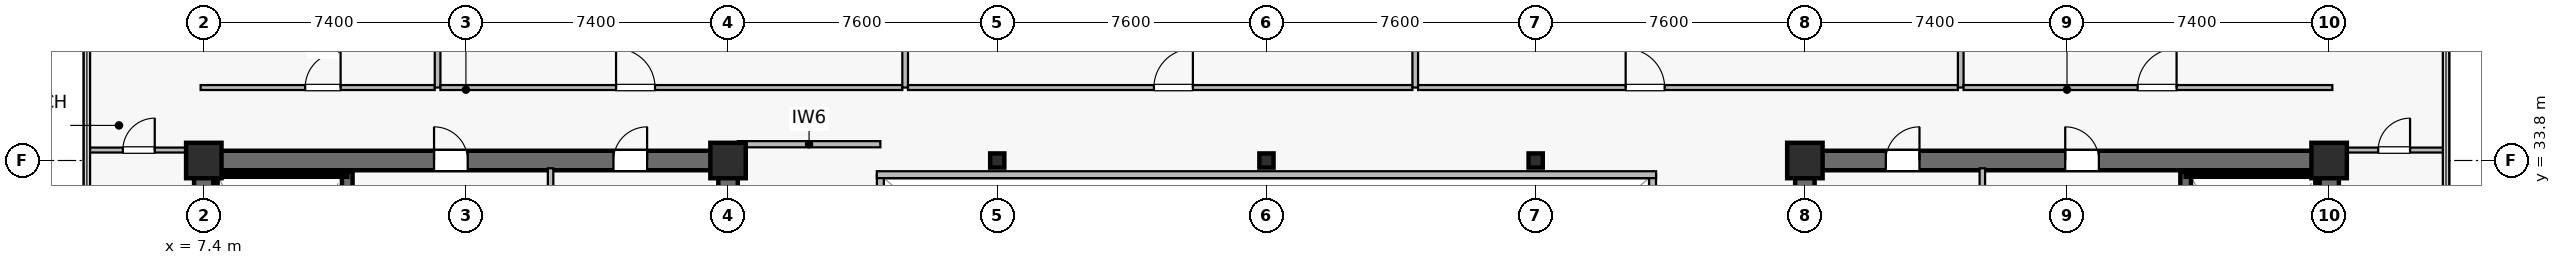
"""IFC4 building model, lengths in metres.
Left out: names, types, materials, properties, quantities, classifications, styles, units other than length and angle.
Written with IfcOpenShell. Run it as: python <this file> out.ifc"""

import sys

from ifc_helpers import new_model, si_unit, direction, frame, frame_2d, origin, origin_2d, place, context, subcontext, project, spatial, rectangle, hollow_rectangle, extrude, source, transform, mapped, element, fill, save


model = new_model("IFC4")
c1 = context("Model", 3, precision=1e-05, world=origin(), true_north=direction((0.0, 1.0)))
c2 = subcontext(c1, "Body", "Model", "MODEL_VIEW")
j1 = project(units=[si_unit("LENGTHUNIT", "METRE"), si_unit("PLANEANGLEUNIT", "RADIAN")], contexts=[c1])
p1 = place(None, origin())
s1 = spatial("IfcSite", under=j1, at=p1, CompositionType="ELEMENT")
p2 = place(p1, origin())
s2 = spatial("IfcBuilding", under=s1, at=p2, CompositionType="ELEMENT")
p3 = place(p2, frame((0.0, 0.0, 217.8)))
s3 = spatial("IfcBuildingStorey", under=s2, at=p3, CompositionType="ELEMENT", Elevation=217.8)
p4 = place(p3, frame((7.125, 33.8, 0.0), z_axis=(0.0, 0.0, 1.0), x_axis=(1.0, 0.0, 0.0)))
e1 = element("IfcWall", 1, at=p4, inside=s3, PredefinedType="SHEAR", context=c2, shape_type="SweptSolid", body=[
    extrude(rectangle(XDim=15.35, YDim=0.55, at=frame_2d((7.675, 0.0))), origin(), (0.0, 0.0, 1.0), 3.8),
])
p5 = place(p4, frame((6.775, 0.0, 0.0)))
e2 = element("IfcOpeningElement", 2, at=p5, cuts=e1, PredefinedType="OPENING", context=c2, shape_type="SweptSolid", body=[
    extrude(rectangle(XDim=0.95, YDim=2.15, at=frame_2d((0.475, 1.075))), frame((0.0, 0.285, 0.0), z_axis=(0.0, -1.0, 0.0), x_axis=(1.0, 0.0, 0.0)), (0.0, 0.0, 1.0), 0.57),
])
p6 = place(p4, frame((11.84, 0.0, 0.0)))
e3 = element("IfcOpeningElement", 3, at=p6, cuts=e1, PredefinedType="OPENING", context=c2, shape_type="SweptSolid", body=[
    extrude(rectangle(XDim=0.95, YDim=2.15, at=frame_2d((0.475, 1.075))), frame((0.0, 0.285, 0.0), z_axis=(0.0, -1.0, 0.0), x_axis=(1.0, 0.0, 0.0)), (0.0, 0.0, 1.0), 0.57),
])
p7 = place(p3, frame((7.4, 15.075, 0.0), z_axis=(0.0, 0.0, 1.0), x_axis=(0.0, 1.0, 0.0)))
e4 = element("IfcWall", 4, at=p7, inside=s3, PredefinedType="SHEAR", context=c2, shape_type="SweptSolid", body=[
    extrude(rectangle(XDim=18.45, YDim=0.55, at=frame_2d((9.225, 0.0))), origin(), (0.0, 0.0, 1.0), 3.8),
])
p8 = place(p3, frame((22.2, 15.075, 0.0), z_axis=(0.0, 0.0, 1.0), x_axis=(0.0, 1.0, 0.0)))
e5 = element("IfcWall", 5, at=p8, inside=s3, PredefinedType="SHEAR", context=c2, shape_type="SweptSolid", body=[
    extrude(rectangle(XDim=18.45, YDim=0.55, at=frame_2d((9.225, 0.0))), origin(), (0.0, 0.0, 1.0), 3.8),
])
p9 = place(p8, frame((3.475, 0.0, 0.0)))
e6 = element("IfcOpeningElement", 6, at=p9, cuts=e5, PredefinedType="OPENING", context=c2, shape_type="SweptSolid", body=[
    extrude(rectangle(XDim=1.42, YDim=2.2, at=frame_2d((0.71, 1.1))), frame((0.0, 0.285, 0.0), z_axis=(0.0, -1.0, 0.0), x_axis=(1.0, 0.0, 0.0)), (0.0, 0.0, 1.0), 0.57),
])
p10 = place(p3, frame((11.45, 24.85, 0.0), z_axis=(0.0, 0.0, 1.0), x_axis=(0.0, 1.0, 0.0)))
e7 = element("IfcWall", 7, at=p10, inside=s3, PredefinedType="SHEAR", context=c2, shape_type="SweptSolid", body=[
    extrude(rectangle(XDim=8.63, YDim=0.3, at=frame_2d((4.315, 0.0))), origin(), (0.0, 0.0, 1.0), 3.8),
])
p11 = place(p10, frame((0.42, 0.0, 0.0)))
e8 = element("IfcOpeningElement", 8, at=p11, cuts=e7, PredefinedType="OPENING", context=c2, shape_type="SweptSolid", body=[
    extrude(rectangle(XDim=1.1, YDim=2.15, at=frame_2d((0.55, 1.075))), frame((0.0, 0.16, 0.0), z_axis=(0.0, -1.0, 0.0), x_axis=(1.0, 0.0, 0.0)), (0.0, 0.0, 1.0), 0.32),
])
p12 = place(p3, frame((7.73, 33.4, 0.0), z_axis=(0.0, 0.0, 1.0), x_axis=(1.0, 0.0, 0.0)))
e9 = element("IfcWall", 9, at=p12, inside=s3, PredefinedType="SOLIDWALL", context=c2, shape_type="SweptSolid", body=[
    extrude(rectangle(XDim=3.72, YDim=0.12, at=frame_2d((1.86, 0.0))), origin(), (0.0, 0.0, 1.0), 3.8),
])
p13 = place(p3, frame((7.73, 25.0, 0.0), z_axis=(0.0, 0.0, 1.0), x_axis=(0.0, 1.0, 0.0)))
e10 = element("IfcWall", 10, at=p13, inside=s3, PredefinedType="SOLIDWALL", context=c2, shape_type="SweptSolid", body=[
    extrude(rectangle(XDim=8.32, YDim=0.12, at=frame_2d((4.16, 0.0))), origin(), (0.0, 0.0, 1.0), 3.8),
])
p14 = place(p3, frame((52.325, 33.8, 0.0), z_axis=(0.0, 0.0, 1.0), x_axis=(1.0, 0.0, 0.0)))
e11 = element("IfcWall", 11, at=p14, inside=s3, PredefinedType="SHEAR", context=c2, shape_type="SweptSolid", body=[
    extrude(rectangle(XDim=15.35, YDim=0.55, at=frame_2d((7.675, 0.0))), origin(), (0.0, 0.0, 1.0), 3.8),
])
p15 = place(p14, frame((7.625, 0.0, 0.0)))
e12 = element("IfcOpeningElement", 12, at=p15, cuts=e11, PredefinedType="OPENING", context=c2, shape_type="SweptSolid", body=[
    extrude(rectangle(XDim=0.95, YDim=2.15, at=frame_2d((0.475, 1.075))), frame((0.0, 0.285, 0.0), z_axis=(0.0, -1.0, 0.0), x_axis=(1.0, 0.0, 0.0)), (0.0, 0.0, 1.0), 0.57),
])
p16 = place(p14, frame((2.56, 0.0, 0.0)))
e13 = element("IfcOpeningElement", 13, at=p16, cuts=e11, PredefinedType="OPENING", context=c2, shape_type="SweptSolid", body=[
    extrude(rectangle(XDim=0.95, YDim=2.15, at=frame_2d((0.475, 1.075))), frame((0.0, 0.285, 0.0), z_axis=(0.0, -1.0, 0.0), x_axis=(1.0, 0.0, 0.0)), (0.0, 0.0, 1.0), 0.57),
])
p17 = place(p3, frame((52.6, 15.075, 0.0), z_axis=(0.0, 0.0, 1.0), x_axis=(0.0, 1.0, 0.0)))
e14 = element("IfcWall", 14, at=p17, inside=s3, PredefinedType="SHEAR", context=c2, shape_type="SweptSolid", body=[
    extrude(rectangle(XDim=18.45, YDim=0.55, at=frame_2d((9.225, 0.0))), origin(), (0.0, 0.0, 1.0), 3.8),
])
p18 = place(p17, frame((3.475, 0.0, 0.0)))
e15 = element("IfcOpeningElement", 15, at=p18, cuts=e14, PredefinedType="OPENING", context=c2, shape_type="SweptSolid", body=[
    extrude(rectangle(XDim=1.42, YDim=2.2, at=frame_2d((0.71, 1.1))), frame((0.0, 0.285, 0.0), z_axis=(0.0, -1.0, 0.0), x_axis=(1.0, 0.0, 0.0)), (0.0, 0.0, 1.0), 0.57),
])
p19 = place(p3, frame((67.4, 15.075, 0.0), z_axis=(0.0, 0.0, 1.0), x_axis=(0.0, 1.0, 0.0)))
e16 = element("IfcWall", 16, at=p19, inside=s3, PredefinedType="SHEAR", context=c2, shape_type="SweptSolid", body=[
    extrude(rectangle(XDim=18.45, YDim=0.55, at=frame_2d((9.225, 0.0))), origin(), (0.0, 0.0, 1.0), 3.8),
])
p20 = place(p3, frame((63.35, 24.85, 0.0), z_axis=(0.0, 0.0, 1.0), x_axis=(0.0, 1.0, 0.0)))
e17 = element("IfcWall", 17, at=p20, inside=s3, PredefinedType="SHEAR", context=c2, shape_type="SweptSolid", body=[
    extrude(rectangle(XDim=8.63, YDim=0.3, at=frame_2d((4.315, 0.0))), origin(), (0.0, 0.0, 1.0), 3.8),
])
p21 = place(p20, frame((0.42, 0.0, 0.0)))
e18 = element("IfcOpeningElement", 18, at=p21, cuts=e17, PredefinedType="OPENING", context=c2, shape_type="SweptSolid", body=[
    extrude(rectangle(XDim=1.1, YDim=2.15, at=frame_2d((0.55, 1.075))), frame((0.0, 0.16, 0.0), z_axis=(0.0, -1.0, 0.0), x_axis=(1.0, 0.0, 0.0)), (0.0, 0.0, 1.0), 0.32),
])
p22 = place(p3, frame((63.35, 33.4, 0.0), z_axis=(0.0, 0.0, 1.0), x_axis=(1.0, 0.0, 0.0)))
e19 = element("IfcWall", 19, at=p22, inside=s3, PredefinedType="SOLIDWALL", context=c2, shape_type="SweptSolid", body=[
    extrude(rectangle(XDim=3.72, YDim=0.12, at=frame_2d((1.86, 0.0))), origin(), (0.0, 0.0, 1.0), 3.8),
])
p23 = place(p3, frame((67.07, 25.0, 0.0), z_axis=(0.0, 0.0, 1.0), x_axis=(0.0, 1.0, 0.0)))
e20 = element("IfcWall", 20, at=p23, inside=s3, PredefinedType="SOLIDWALL", context=c2, shape_type="SweptSolid", body=[
    extrude(rectangle(XDim=8.32, YDim=0.12, at=frame_2d((4.16, 0.0))), origin(), (0.0, 0.0, 1.0), 3.8),
])
m1 = source(origin(), c2, "Body", "SweptSolid", [
    extrude(rectangle(XDim=1.0, YDim=1.0, at=origin_2d()), origin(), (0.0, 0.0, 1.0), 4.1),
])
for number, where, z_axis, x_axis in (
    (21, (7.4, 33.8, 0.0), (0.0, 0.0, 1.0), (1.0, 0.0, 0.0)),
    (22, (22.2, 33.8, 0.0), (0.0, 0.0, 1.0), (1.0, 0.0, 0.0)),
    (23, (52.6, 33.8, 0.0), (0.0, 0.0, 1.0), (1.0, 0.0, 0.0)),
    (24, (67.4, 33.8, 0.0), (0.0, 0.0, 1.0), (1.0, 0.0, 0.0)),
):
    element("IfcColumn", number, at=place(p3, frame(where, z_axis=z_axis, x_axis=x_axis)), inside=s3, PredefinedType="COLUMN", context=c2, shape_type="MappedRepresentation", body=[
        mapped(m1, transform((0.0, 0.0, 0.0), scale=1.0)),
    ])
m2 = source(origin(), c2, "Body", "SweptSolid", [
    extrude(hollow_rectangle(XDim=0.4, YDim=0.4, WallThickness=0.019, at=origin_2d()), origin(), (0.0, 0.0, 1.0), 4.1),
])
for number, where, z_axis, x_axis in (
    (25, (29.8, 33.8, 0.0), (0.0, 0.0, 1.0), (1.0, 0.0, 0.0)),
    (26, (37.4, 33.8, 0.0), (0.0, 0.0, 1.0), (1.0, 0.0, 0.0)),
    (27, (45.0, 33.8, 0.0), (0.0, 0.0, 1.0), (1.0, 0.0, 0.0)),
):
    element("IfcColumn", number, at=place(p3, frame(where, z_axis=z_axis, x_axis=x_axis)), inside=s3, PredefinedType="COLUMN", context=c2, shape_type="MappedRepresentation", body=[
        mapped(m2, transform((0.0, 0.0, 0.0), scale=1.0)),
    ])
for number, where, z_axis, x_axis in (
    (28, (17.19, 29.65, 0.0), (0.0, 0.0, 1.0), (0.0, 1.0, 0.0)),
    (29, (57.61, 29.65, 0.0), (0.0, 0.0, 1.0), (0.0, 1.0, 0.0)),
):
    element("IfcWall", number, at=place(p3, frame(where, z_axis=z_axis, x_axis=x_axis)), inside=s3, PredefinedType="PLUMBINGWALL", context=c2, shape_type="SweptSolid", body=[
        extrude(rectangle(XDim=3.93, YDim=0.155, at=frame_2d((1.965, 0.0))), origin(), (0.0, 0.0, 1.0), 3.8),
    ])
p24 = place(p3, frame((22.475, 34.26, 0.0), z_axis=(0.0, 0.0, 1.0), x_axis=(1.0, 0.0, 0.0)))
e30 = element("IfcWall", 30, at=p24, inside=s3, PredefinedType="PARTITIONING", context=c2, shape_type="SweptSolid", body=[
    extrude(rectangle(XDim=4.025, YDim=0.175, at=frame_2d((2.012, 0.0))), origin(), (0.0, 0.0, 1.0), 3.485),
])
p25 = place(p3, frame((26.5, 15.2, 0.0), z_axis=(0.0, 0.0, 1.0), x_axis=(0.0, 1.0, 0.0)))
e31 = element("IfcWall", 31, at=p25, inside=s3, PredefinedType="SOLIDWALL", context=c2, shape_type="SweptSolid", body=[
    extrude(rectangle(XDim=18.2, YDim=0.195, at=frame_2d((9.1, 0.0))), origin(), (0.0, 0.0, 1.0), 3.8),
])
p26 = place(p25, frame((1.8, 0.0, 0.9)))
e32 = element("IfcOpeningElement", 32, at=p26, cuts=e31, PredefinedType="OPENING", context=c2, shape_type="SweptSolid", body=[
    extrude(rectangle(XDim=1.5, YDim=1.4, at=frame_2d((0.75, 0.7))), frame((0.0, 0.107, 0.0), z_axis=(0.0, -1.0, 0.0), x_axis=(1.0, 0.0, 0.0)), (0.0, 0.0, 1.0), 0.215),
])
p27 = place(p25, frame((13.2, 0.0, 0.9)))
e33 = element("IfcOpeningElement", 33, at=p27, cuts=e31, PredefinedType="OPENING", context=c2, shape_type="SweptSolid", body=[
    extrude(rectangle(XDim=1.5, YDim=1.4, at=frame_2d((0.75, 0.7))), frame((0.0, 0.107, 0.0), z_axis=(0.0, -1.0, 0.0), x_axis=(1.0, 0.0, 0.0)), (0.0, 0.0, 1.0), 0.215),
])
p28 = place(p3, frame((48.3, 15.2, 0.0), z_axis=(0.0, 0.0, 1.0), x_axis=(0.0, 1.0, 0.0)))
e34 = element("IfcWall", 34, at=p28, inside=s3, PredefinedType="SOLIDWALL", context=c2, shape_type="SweptSolid", body=[
    extrude(rectangle(XDim=18.2, YDim=0.195, at=frame_2d((9.1, 0.0))), origin(), (0.0, 0.0, 1.0), 3.8),
])
p29 = place(p28, frame((1.8, 0.0, 0.9)))
e35 = element("IfcOpeningElement", 35, at=p29, cuts=e34, PredefinedType="OPENING", context=c2, shape_type="SweptSolid", body=[
    extrude(rectangle(XDim=1.5, YDim=1.4, at=frame_2d((0.75, 0.7))), frame((0.0, 0.107, 0.0), z_axis=(0.0, -1.0, 0.0), x_axis=(1.0, 0.0, 0.0)), (0.0, 0.0, 1.0), 0.215),
])
p30 = place(p28, frame((13.2, 0.0, 0.9)))
e36 = element("IfcOpeningElement", 36, at=p30, cuts=e34, PredefinedType="OPENING", context=c2, shape_type="SweptSolid", body=[
    extrude(rectangle(XDim=1.5, YDim=1.4, at=frame_2d((0.75, 0.7))), frame((0.0, 0.107, 0.0), z_axis=(0.0, -1.0, 0.0), x_axis=(1.0, 0.0, 0.0)), (0.0, 0.0, 1.0), 0.215),
])
p31 = place(p3, frame((26.4, 33.4, 0.0), z_axis=(0.0, 0.0, 1.0), x_axis=(1.0, 0.0, 0.0)))
e37 = element("IfcWall", 37, at=p31, inside=s3, PredefinedType="SOLIDWALL", context=c2, shape_type="SweptSolid", body=[
    extrude(rectangle(XDim=22.0, YDim=0.195, at=frame_2d((11.0, 0.0))), origin(), (0.0, 0.0, 1.0), 3.8),
])
p32 = place(p3, frame((7.31, 35.86, 0.0), z_axis=(0.0, 0.0, 1.0), x_axis=(1.0, 0.0, 0.0)))
e38 = element("IfcWall", 38, at=p32, inside=s3, PredefinedType="PARTITIONING", context=c2, shape_type="SweptSolid", body=[
    extrude(rectangle(XDim=6.61, YDim=0.14, at=frame_2d((3.305, 0.0))), origin(), (0.0, 0.0, 1.0), 3.335),
])
p33 = place(p32, frame((2.952, 0.0, 0.0)))
e39 = element("IfcOpeningElement", 39, at=p33, cuts=e38, PredefinedType="OPENING", context=c2, shape_type="SweptSolid", body=[
    extrude(rectangle(XDim=1.0, YDim=2.15, at=frame_2d((0.5, 1.075))), frame((0.0, 0.08, 0.0), z_axis=(0.0, -1.0, 0.0), x_axis=(1.0, 0.0, 0.0)), (0.0, 0.0, 1.0), 0.16),
])
p34 = place(p3, frame((14.0, 35.86, 0.0), z_axis=(0.0, 0.0, 1.0), x_axis=(0.0, 1.0, 0.0)))
e40 = element("IfcWall", 40, at=p34, inside=s3, PredefinedType="PARTITIONING", context=c2, shape_type="SweptSolid", body=[
    extrude(rectangle(XDim=10.03, YDim=0.16, at=frame_2d((5.015, 0.0))), origin(), (0.0, 0.0, 1.0), 3.135),
])
p35 = place(p3, frame((14.08, 35.86, 0.0), z_axis=(0.0, 0.0, 1.0), x_axis=(1.0, 0.0, 0.0)))
e41 = element("IfcWall", 41, at=p35, inside=s3, PredefinedType="PARTITIONING", context=c2, shape_type="SweptSolid", body=[
    extrude(rectangle(XDim=13.04, YDim=0.14, at=frame_2d((6.52, 0.0))), origin(), (0.0, 0.0, 1.0), 3.197),
])
p36 = place(p35, frame((4.958, 0.0, 0.0)))
e42 = element("IfcOpeningElement", 42, at=p36, cuts=e41, PredefinedType="OPENING", context=c2, shape_type="SweptSolid", body=[
    extrude(rectangle(XDim=1.1, YDim=2.18, at=frame_2d((0.55, 1.09))), frame((0.0, 0.08, 0.0), z_axis=(0.0, -1.0, 0.0), x_axis=(1.0, 0.0, 0.0)), (0.0, 0.0, 1.0), 0.16),
])
p37 = place(p3, frame((27.2, 35.86, 0.0), z_axis=(0.0, 0.0, 1.0), x_axis=(0.0, 1.0, 0.0)))
e43 = element("IfcWall", 43, at=p37, inside=s3, PredefinedType="PARTITIONING", context=c2, shape_type="SweptSolid", body=[
    extrude(rectangle(XDim=8.83, YDim=0.16, at=frame_2d((4.415, 0.0))), origin(), (0.0, 0.0, 1.0), 3.135),
])
p38 = place(p3, frame((27.28, 35.86, 0.0), z_axis=(0.0, 0.0, 1.0), x_axis=(1.0, 0.0, 0.0)))
e44 = element("IfcWall", 44, at=p38, inside=s3, PredefinedType="PARTITIONING", context=c2, shape_type="SweptSolid", body=[
    extrude(rectangle(XDim=14.24, YDim=0.14, at=frame_2d((7.12, 0.0))), origin(), (0.0, 0.0, 1.0), 3.197),
])
p39 = place(p38, frame((6.943, 0.0, 0.0)))
e45 = element("IfcOpeningElement", 45, at=p39, cuts=e44, PredefinedType="OPENING", context=c2, shape_type="SweptSolid", body=[
    extrude(rectangle(XDim=1.1, YDim=2.18, at=frame_2d((0.55, 1.09))), frame((0.0, 0.08, 0.0), z_axis=(0.0, -1.0, 0.0), x_axis=(1.0, 0.0, 0.0)), (0.0, 0.0, 1.0), 0.16),
])
p40 = place(p3, frame((41.6, 35.86, 0.0), z_axis=(0.0, 0.0, 1.0), x_axis=(0.0, 1.0, 0.0)))
e46 = element("IfcWall", 46, at=p40, inside=s3, PredefinedType="PARTITIONING", context=c2, shape_type="SweptSolid", body=[
    extrude(rectangle(XDim=8.83, YDim=0.16, at=frame_2d((4.415, 0.0))), origin(), (0.0, 0.0, 1.0), 3.135),
])
p41 = place(p3, frame((41.68, 35.86, 0.0), z_axis=(0.0, 0.0, 1.0), x_axis=(1.0, 0.0, 0.0)))
e47 = element("IfcWall", 47, at=p41, inside=s3, PredefinedType="PARTITIONING", context=c2, shape_type="SweptSolid", body=[
    extrude(rectangle(XDim=15.24, YDim=0.14, at=frame_2d((7.62, 0.0))), origin(), (0.0, 0.0, 1.0), 3.197),
])
p42 = place(p41, frame((5.86, 0.0, 0.0)))
e48 = element("IfcOpeningElement", 48, at=p42, cuts=e47, PredefinedType="OPENING", context=c2, shape_type="SweptSolid", body=[
    extrude(rectangle(XDim=1.1, YDim=2.18, at=frame_2d((0.55, 1.09))), frame((0.0, 0.08, 0.0), z_axis=(0.0, -1.0, 0.0), x_axis=(1.0, 0.0, 0.0)), (0.0, 0.0, 1.0), 0.16),
])
p43 = place(p3, frame((57.0, 35.86, 0.0), z_axis=(0.0, 0.0, 1.0), x_axis=(0.0, 1.0, 0.0)))
e49 = element("IfcWall", 49, at=p43, inside=s3, PredefinedType="PARTITIONING", context=c2, shape_type="SweptSolid", body=[
    extrude(rectangle(XDim=10.03, YDim=0.16, at=frame_2d((5.015, 0.0))), origin(), (0.0, 0.0, 1.0), 3.135),
])
p44 = place(p3, frame((57.08, 35.86, 0.0), z_axis=(0.0, 0.0, 1.0), x_axis=(1.0, 0.0, 0.0)))
e50 = element("IfcWall", 50, at=p44, inside=s3, PredefinedType="PARTITIONING", context=c2, shape_type="SweptSolid", body=[
    extrude(rectangle(XDim=10.41, YDim=0.14, at=frame_2d((5.205, 0.0))), origin(), (0.0, 0.0, 1.0), 3.197),
])
p45 = place(p44, frame((4.913, 0.0, 0.0)))
e51 = element("IfcOpeningElement", 51, at=p45, cuts=e50, PredefinedType="OPENING", context=c2, shape_type="SweptSolid", body=[
    extrude(rectangle(XDim=1.1, YDim=2.18, at=frame_2d((0.55, 1.09))), frame((0.0, 0.08, 0.0), z_axis=(0.0, -1.0, 0.0), x_axis=(1.0, 0.0, 0.0)), (0.0, 0.0, 1.0), 0.16),
])
p46 = place(p3, frame((4.11, 34.095, 0.0), z_axis=(0.0, 0.0, 1.0), x_axis=(1.0, 0.0, 0.0)))
e52 = element("IfcWall", 52, at=p46, inside=s3, PredefinedType="PARTITIONING", context=c2, shape_type="SweptSolid", body=[
    extrude(rectangle(XDim=2.91, YDim=0.14, at=frame_2d((1.455, 0.0))), origin(), (0.0, 0.0, 1.0), 3.8),
])
p47 = place(p46, frame((1.005, 0.0, 0.0)))
e53 = element("IfcOpeningElement", 53, at=p47, cuts=e52, PredefinedType="OPENING", context=c2, shape_type="SweptSolid", body=[
    extrude(rectangle(XDim=0.9, YDim=2.1, at=frame_2d((0.45, 1.05))), frame((0.0, 0.08, 0.0), z_axis=(0.0, -1.0, 0.0), x_axis=(1.0, 0.0, 0.0)), (0.0, 0.0, 1.0), 0.16),
])
p48 = place(p3, frame((67.78, 34.095, 0.0), z_axis=(0.0, 0.0, 1.0), x_axis=(1.0, 0.0, 0.0)))
e54 = element("IfcWall", 54, at=p48, inside=s3, PredefinedType="PARTITIONING", context=c2, shape_type="SweptSolid", body=[
    extrude(rectangle(XDim=2.91, YDim=0.14, at=frame_2d((1.455, 0.0))), origin(), (0.0, 0.0, 1.0), 3.8),
])
p49 = place(p48, frame((1.005, 0.0, 0.0)))
e55 = element("IfcOpeningElement", 55, at=p49, cuts=e54, PredefinedType="OPENING", context=c2, shape_type="SweptSolid", body=[
    extrude(rectangle(XDim=0.9, YDim=2.1, at=frame_2d((0.45, 1.05))), frame((0.0, 0.08, 0.0), z_axis=(0.0, -1.0, 0.0), x_axis=(1.0, 0.0, 0.0)), (0.0, 0.0, 1.0), 0.16),
])
m3 = source(origin(), c2, "Body", "SweptSolid", [
    extrude(rectangle(XDim=0.95, YDim=2.15, at=frame_2d((0.475, 1.075))), frame((0.0, 0.025, 0.0), z_axis=(0.0, -1.0, 0.0), x_axis=(1.0, 0.0, 0.0)), (0.0, 0.0, 1.0), 0.05),
])
p50 = place(p5, origin())
e56 = element("IfcDoor", 56, at=p50, inside=s3, OperationType="SINGLE_SWING_LEFT", PredefinedType="DOOR", context=c2, shape_type="MappedRepresentation", body=[
    mapped(m3, transform((0.0, 0.0, 0.0), scale=1.0)),
])
fill(e2, e56)
p51 = place(p6, origin())
e57 = element("IfcDoor", 57, at=p51, inside=s3, OperationType="SINGLE_SWING_RIGHT", PredefinedType="DOOR", context=c2, shape_type="MappedRepresentation", body=[
    mapped(m3, transform((0.0, 0.0, 0.0), scale=1.0)),
])
fill(e3, e57)
p52 = place(p15, origin())
e58 = element("IfcDoor", 58, at=p52, inside=s3, OperationType="SINGLE_SWING_LEFT", PredefinedType="DOOR", context=c2, shape_type="MappedRepresentation", body=[
    mapped(m3, transform((0.0, 0.0, 0.0), scale=1.0)),
])
fill(e12, e58)
p53 = place(p16, origin())
e59 = element("IfcDoor", 59, at=p53, inside=s3, OperationType="SINGLE_SWING_RIGHT", PredefinedType="DOOR", context=c2, shape_type="MappedRepresentation", body=[
    mapped(m3, transform((0.0, 0.0, 0.0), scale=1.0)),
])
fill(e13, e59)
m4 = source(origin(), c2, "Body", "SweptSolid", [
    extrude(rectangle(XDim=1.0, YDim=2.15, at=frame_2d((0.5, 1.075))), frame((0.0, 0.025, 0.0), z_axis=(0.0, -1.0, 0.0), x_axis=(1.0, 0.0, 0.0)), (0.0, 0.0, 1.0), 0.05),
])
p54 = place(p33, origin())
e60 = element("IfcDoor", 60, at=p54, inside=s3, OperationType="SINGLE_SWING_RIGHT", PredefinedType="DOOR", context=c2, shape_type="MappedRepresentation", body=[
    mapped(m4, transform((0.0, 0.0, 0.0), scale=1.0)),
])
fill(e39, e60)
m5 = source(origin(), c2, "Body", "SweptSolid", [
    extrude(rectangle(XDim=1.1, YDim=2.18, at=frame_2d((0.55, 1.09))), frame((0.0, 0.025, 0.0), z_axis=(0.0, -1.0, 0.0), x_axis=(1.0, 0.0, 0.0)), (0.0, 0.0, 1.0), 0.05),
])
p55 = place(p36, origin())
e61 = element("IfcDoor", 61, at=p55, inside=s3, OperationType="SINGLE_SWING_LEFT", PredefinedType="DOOR", context=c2, shape_type="MappedRepresentation", body=[
    mapped(m5, transform((0.0, 0.0, 0.0), scale=1.0)),
])
fill(e42, e61)
p56 = place(p39, origin())
e62 = element("IfcDoor", 62, at=p56, inside=s3, OperationType="SINGLE_SWING_RIGHT", PredefinedType="DOOR", context=c2, shape_type="MappedRepresentation", body=[
    mapped(m5, transform((0.0, 0.0, 0.0), scale=1.0)),
])
fill(e45, e62)
p57 = place(p42, origin())
e63 = element("IfcDoor", 63, at=p57, inside=s3, OperationType="SINGLE_SWING_LEFT", PredefinedType="DOOR", context=c2, shape_type="MappedRepresentation", body=[
    mapped(m5, transform((0.0, 0.0, 0.0), scale=1.0)),
])
fill(e48, e63)
p58 = place(p45, origin())
e64 = element("IfcDoor", 64, at=p58, inside=s3, OperationType="SINGLE_SWING_RIGHT", PredefinedType="DOOR", context=c2, shape_type="MappedRepresentation", body=[
    mapped(m5, transform((0.0, 0.0, 0.0), scale=1.0)),
])
fill(e51, e64)
m6 = source(origin(), c2, "Body", "SweptSolid", [
    extrude(rectangle(XDim=0.9, YDim=2.1, at=frame_2d((0.45, 1.05))), frame((0.0, 0.025, 0.0), z_axis=(0.0, -1.0, 0.0), x_axis=(1.0, 0.0, 0.0)), (0.0, 0.0, 1.0), 0.05),
])
p59 = place(p47, origin())
e65 = element("IfcDoor", 65, at=p59, inside=s3, OperationType="SINGLE_SWING_RIGHT", PredefinedType="DOOR", context=c2, shape_type="MappedRepresentation", body=[
    mapped(m6, transform((0.0, 0.0, 0.0), scale=1.0)),
])
fill(e53, e65)
p60 = place(p49, origin())
e66 = element("IfcDoor", 66, at=p60, inside=s3, OperationType="SINGLE_SWING_RIGHT", PredefinedType="DOOR", context=c2, shape_type="MappedRepresentation", body=[
    mapped(m6, transform((0.0, 0.0, 0.0), scale=1.0)),
])
fill(e55, e66)
save(model, sys.argv[1])
